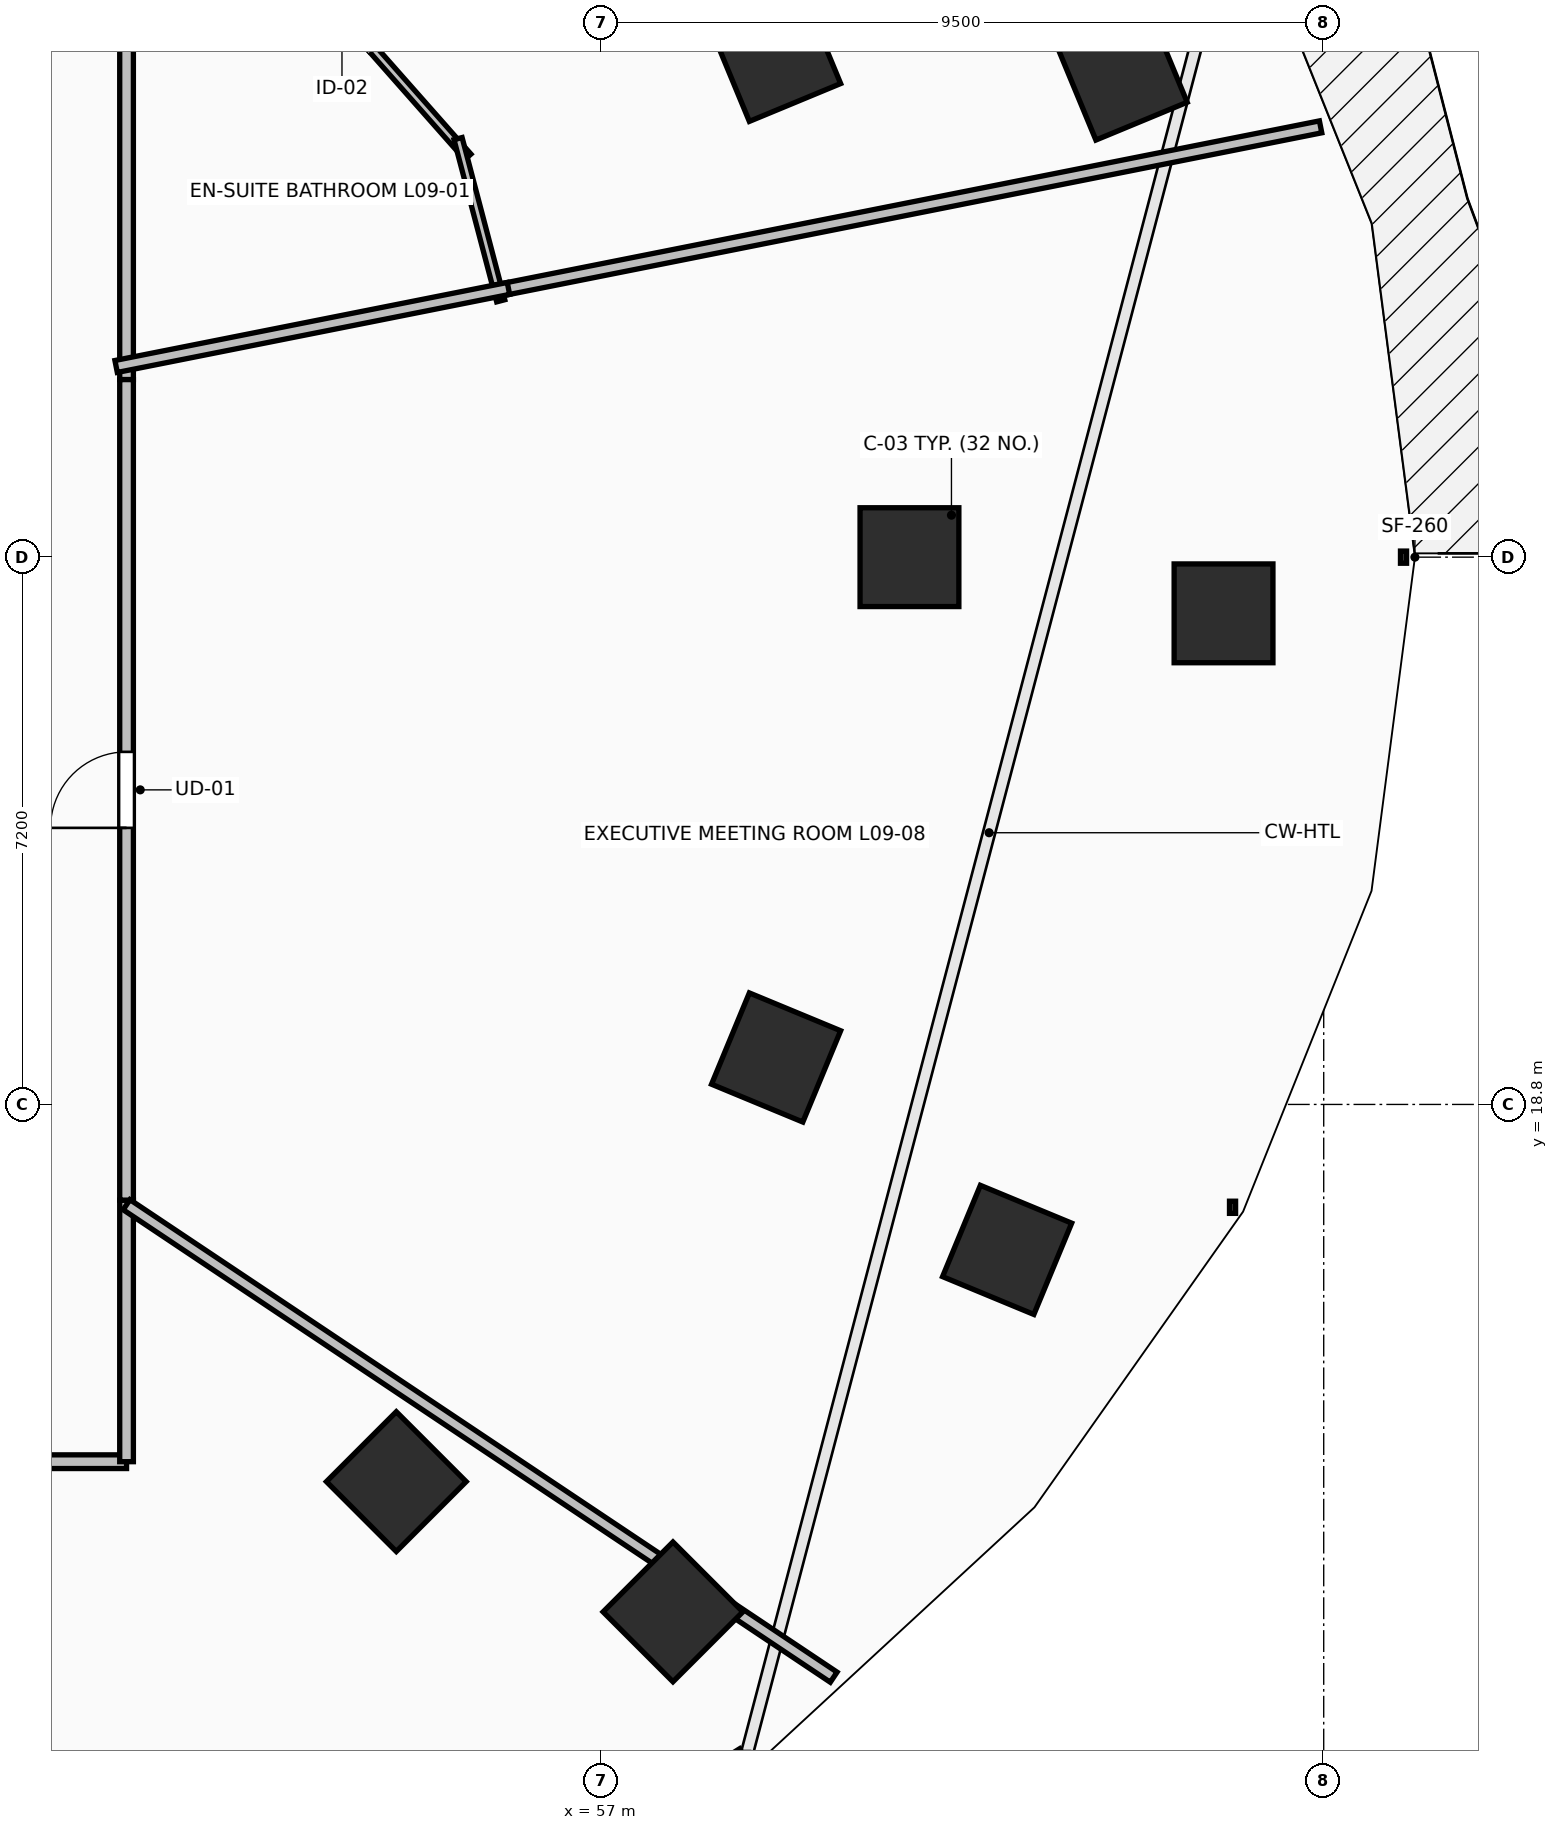
"""IFC4 building model, lengths in metres.
Left out: names, types, materials, properties, quantities, classifications, styles, units other than length and angle.
Written with IfcOpenShell. Run it as: python <this file> out.ifc"""

import sys

from ifc_helpers import new_model, si_unit, direction, frame, frame_2d, origin, origin_2d, place, context, subcontext, project, spatial, rectangle, extrude, element, fill, save


model = new_model("IFC4")
c1 = context("Model", 3, precision=1e-05, world=origin(), true_north=direction((0.0, 1.0)))
c2 = subcontext(c1, "Body", "Model", "MODEL_VIEW")
j1 = project(units=[si_unit("LENGTHUNIT", "METRE"), si_unit("PLANEANGLEUNIT", "RADIAN")], contexts=[c1])
p1 = place(None, origin())
s1 = spatial("IfcSite", under=j1, at=p1, CompositionType="ELEMENT")
p2 = place(p1, origin())
s2 = spatial("IfcBuilding", under=s1, at=p2, CompositionType="ELEMENT")
p3 = place(p2, frame((0.0, 0.0, 38.0)))
s3 = spatial("IfcBuildingStorey", under=s2, at=p3, CompositionType="ELEMENT", Elevation=38.0)
for number, where, z_axis, x_axis in (
    (1, (61.05, 26.0, 0.0), (0.0, 0.0, 1.0), (1.0, 0.0, 0.0)),
    (2, (59.295, 32.582, 0.0), (0.0, 0.0, 1.0), (0.924, 0.383, 0.0)),
    (3, (54.299, 13.838, 0.0), (0.0, 0.0, 1.0), (0.707, -0.707, 0.0)),
    (4, (59.295, 19.418, 0.0), (0.0, 0.0, 1.0), (0.924, -0.383, 0.0)),
    (5, (65.182, 25.261, 0.0), (0.0, 0.0, 1.0), (1.0, 0.0, 0.0)),
    (6, (63.854, 32.337, 0.0), (0.0, 0.0, 1.0), (0.924, 0.383, 0.0)),
    (7, (57.939, 12.124, 0.0), (0.0, 0.0, 1.0), (0.707, -0.707, 0.0)),
    (8, (62.335, 16.886, 0.0), (0.0, 0.0, 1.0), (0.924, -0.383, 0.0)),
):
    element("IfcColumn", number, at=place(p3, frame(where, z_axis=z_axis, x_axis=x_axis)), inside=s3, PredefinedType="COLUMN", context=c2, shape_type="SweptSolid", body=[
        extrude(rectangle(XDim=1.3, YDim=1.3, at=origin_2d()), origin(), (0.0, 0.0, 1.0), 3.5),
    ])
p4 = place(p3, frame((54.417, 7.417, 0.0), z_axis=(0.0, 0.0, 1.0), x_axis=(0.849633724826, 0.527373239404, 0.0)))
e9 = element("IfcWall", 9, at=p4, inside=s3, PredefinedType="STANDARD", context=c2, shape_type="SweptSolid", body=[
    extrude(rectangle(XDim=5.271, YDim=0.3, at=frame_2d((2.635, 0.0))), origin(), (0.0, 0.0, 1.0), 3.24),
])
p5 = place(p4, frame((1.885, 0.0, 0.85)))
e10 = element("IfcOpeningElement", 10, at=p5, cuts=e9, PredefinedType="OPENING", context=c2, shape_type="SweptSolid", body=[
    extrude(rectangle(XDim=1.5, YDim=2.19, at=frame_2d((0.75, 1.095))), frame((0.0, 0.165, 0.0), z_axis=(0.0, -1.0, 0.0), x_axis=(1.0, 0.0, 0.0)), (0.0, 0.0, 1.0), 0.33),
])
p6 = place(p3, frame((50.75, 28.336, 0.0), z_axis=(0.0, 0.0, 1.0), x_axis=(0.0, 1.0, 0.0)))
e11 = element("IfcWall", 11, at=p6, inside=s3, PredefinedType="PARTITIONING", context=c2, shape_type="SweptSolid", body=[
    extrude(rectangle(XDim=5.42, YDim=0.18, at=frame_2d((2.71, 0.0))), origin(), (0.0, 0.0, 1.0), 2.432),
])
p7 = place(p3, frame((42.34, 14.1, 0.0), z_axis=(0.0, 0.0, 1.0), x_axis=(1.0, 0.0, 0.0)))
e12 = element("IfcWall", 12, at=p7, inside=s3, PredefinedType="PARTITIONING", context=c2, shape_type="SweptSolid", body=[
    extrude(rectangle(XDim=8.41, YDim=0.18, at=frame_2d((4.205, 0.0))), origin(), (0.0, 0.0, 1.0), 2.432),
])
p8 = place(p7, frame((3.705, 0.0, 0.0)))
e13 = element("IfcOpeningElement", 13, at=p8, cuts=e12, PredefinedType="OPENING", context=c2, shape_type="SweptSolid", body=[
    extrude(rectangle(XDim=1.0, YDim=2.15, at=frame_2d((0.5, 1.075))), frame((0.0, 0.105, 0.0), z_axis=(0.0, -1.0, 0.0), x_axis=(1.0, 0.0, 0.0)), (0.0, 0.0, 1.0), 0.21),
])
p9 = place(p3, frame((50.75, 14.1, 0.0), z_axis=(0.0, 0.0, 1.0), x_axis=(0.0, 1.0, 0.0)))
e14 = element("IfcWall", 14, at=p9, inside=s3, PredefinedType="PARTITIONING", context=c2, shape_type="SweptSolid", body=[
    extrude(rectangle(XDim=3.441, YDim=0.18, at=frame_2d((1.72, 0.0))), origin(), (0.0, 0.0, 1.0), 2.432),
])
p10 = place(p3, frame((50.75, 17.541, 0.0), z_axis=(0.0, 0.0, 1.0), x_axis=(0.0, 1.0, 0.0)))
e15 = element("IfcWall", 15, at=p10, inside=s3, PredefinedType="PARTITIONING", context=c2, shape_type="SweptSolid", body=[
    extrude(rectangle(XDim=10.795, YDim=0.18, at=frame_2d((5.397, 0.0))), origin(), (0.0, 0.0, 1.0), 2.432),
])
p11 = place(p10, frame((4.897, 0.0, 0.0)))
e16 = element("IfcOpeningElement", 16, at=p11, cuts=e15, PredefinedType="OPENING", context=c2, shape_type="SweptSolid", body=[
    extrude(rectangle(XDim=1.0, YDim=2.15, at=frame_2d((0.5, 1.075))), frame((0.0, 0.105, 0.0), z_axis=(0.0, -1.0, 0.0), x_axis=(1.0, 0.0, 0.0)), (0.0, 0.0, 1.0), 0.21),
])
p12 = place(p3, frame((52.198, 34.709, 0.0), z_axis=(0.0, 0.0, 1.0), x_axis=(0.662071486681, -0.74944068913, 0.0)))
e17 = element("IfcWall", 17, at=p12, inside=s3, PredefinedType="PARTITIONING", context=c2, shape_type="SweptSolid", body=[
    extrude(rectangle(XDim=4.594, YDim=0.11, at=frame_2d((2.297, 0.0))), origin(), (0.0, 0.0, 1.0), 2.432),
])
p13 = place(p12, frame((1.872, 0.0, 0.0)))
e18 = element("IfcOpeningElement", 18, at=p13, cuts=e17, PredefinedType="OPENING", context=c2, shape_type="SweptSolid", body=[
    extrude(rectangle(XDim=0.85, YDim=2.1, at=frame_2d((0.425, 1.05))), frame((0.0, 0.07, 0.0), z_axis=(0.0, -1.0, 0.0), x_axis=(1.0, 0.0, 0.0)), (0.0, 0.0, 1.0), 0.14),
])
p14 = place(p3, frame((55.111, 31.506, 0.0), z_axis=(0.0, 0.0, 1.0), x_axis=(0.254389812051, -0.967101764823, 0.0)))
e19 = element("IfcWall", 19, at=p14, inside=s3, PredefinedType="PARTITIONING", context=c2, shape_type="SweptSolid", body=[
    extrude(rectangle(XDim=2.206, YDim=0.11, at=frame_2d((1.103, 0.0))), origin(), (0.0, 0.0, 1.0), 3.24),
])
p15 = place(p3, frame((55.637, 29.508, 0.0), z_axis=(0.0, 0.0, 1.0), x_axis=(0.980781844691, 0.195107593712, 0.0)))
e20 = element("IfcWall", 20, at=p15, inside=s3, PredefinedType="PARTITIONING", context=c2, shape_type="SweptSolid", body=[
    extrude(rectangle(XDim=11.034, YDim=0.16, at=frame_2d((5.517, 0.0))), origin(), (0.0, 0.0, 1.0), 2.624),
])
p16 = place(p3, frame((50.613, 28.509, 0.0), z_axis=(0.0, 0.0, 1.0), x_axis=(0.980788877604, 0.195072236795, 0.0)))
e21 = element("IfcWall", 21, at=p16, inside=s3, PredefinedType="PARTITIONING", context=c2, shape_type="SweptSolid", body=[
    extrude(rectangle(XDim=5.263, YDim=0.16, at=frame_2d((2.631, 0.0))), origin(), (0.0, 0.0, 1.0), 2.972),
])
p17 = place(p3, frame((60.053, 11.265, 0.0), z_axis=(0.0, 0.0, 1.0), x_axis=(-0.831469078055, 0.555571032577, 0.0)))
e22 = element("IfcWall", 22, at=p17, inside=s3, PredefinedType="PARTITIONING", context=c2, shape_type="SweptSolid", body=[
    extrude(rectangle(XDim=11.189, YDim=0.16, at=frame_2d((5.594, 0.0))), origin(), (0.0, 0.0, 1.0), 2.624),
])
p18 = place(p11, origin())
e23 = element("IfcDoor", 23, at=p18, inside=s3, OperationType="SINGLE_SWING_LEFT", PredefinedType="DOOR", context=c2, shape_type="SweptSolid", body=[
    extrude(rectangle(XDim=1.0, YDim=2.15, at=frame_2d((0.5, 1.075))), frame((0.0, 0.025, 0.0), z_axis=(0.0, -1.0, 0.0), x_axis=(1.0, 0.0, 0.0)), (0.0, 0.0, 1.0), 0.05),
])
fill(e16, e23)
save(model, sys.argv[1])
